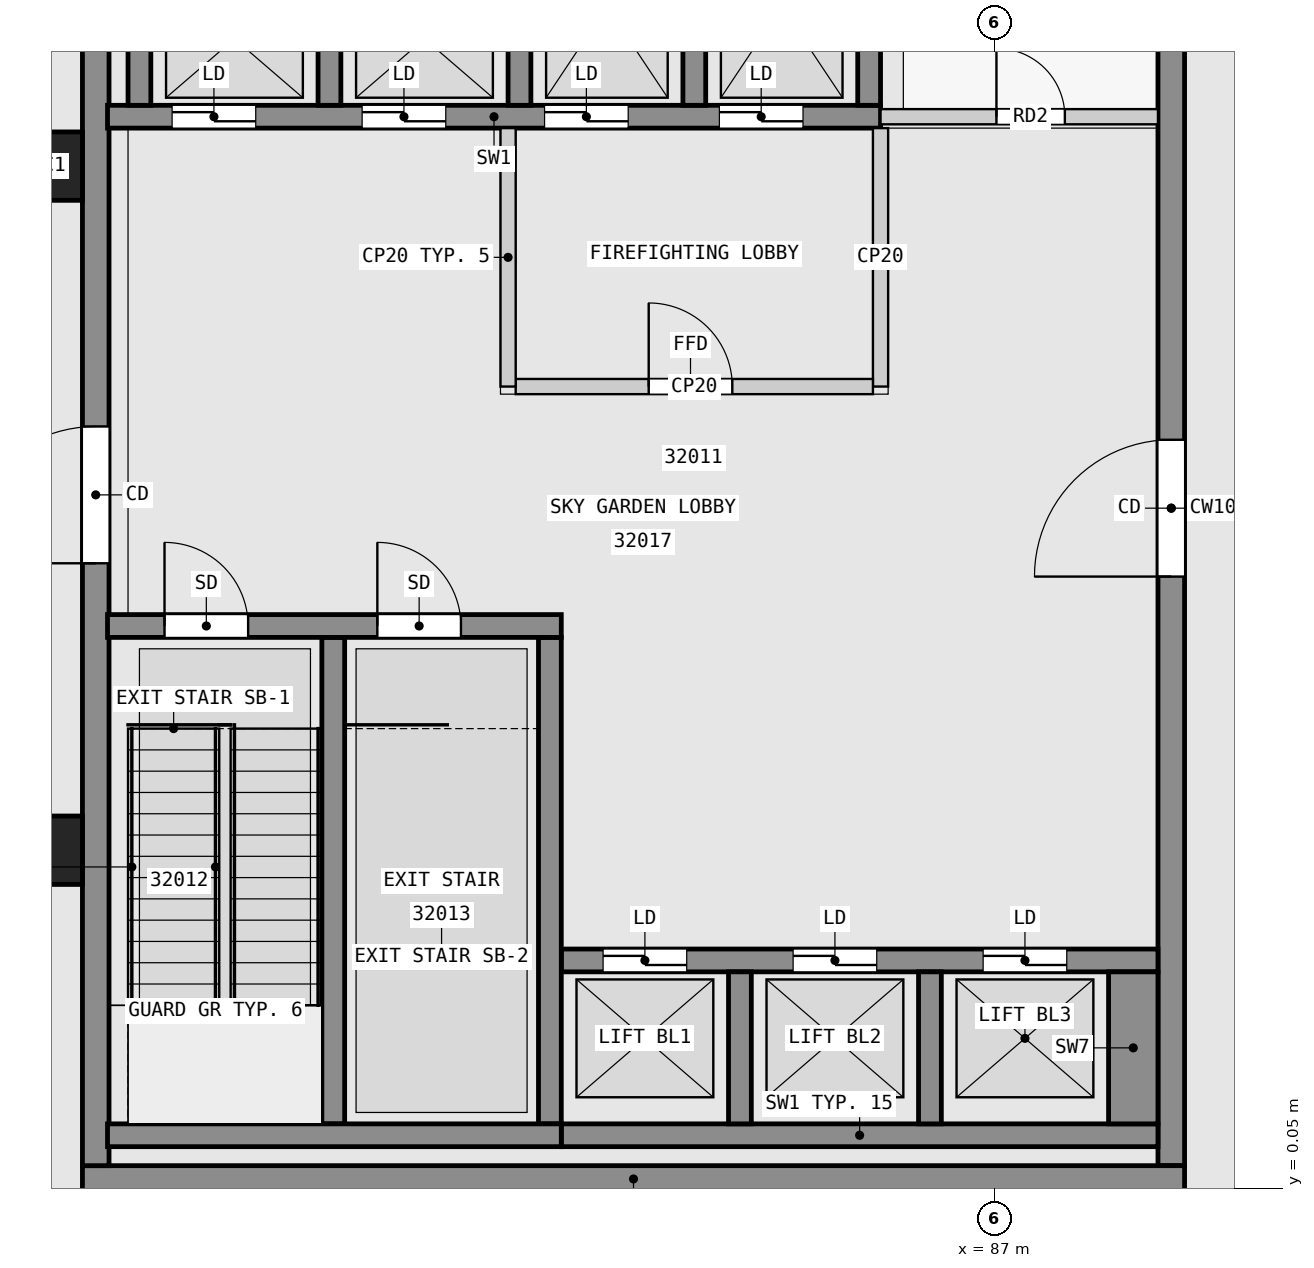
"""IFC4 building model, lengths in metres.
Left out: names, types, materials, properties, quantities, classifications, styles, units other than length and angle.
Written with IfcOpenShell. Run it as: python <this file> out.ifc"""

import sys

from ifc_helpers import new_model, si_unit, direction, frame, frame_2d, origin, origin_2d, place, context, subcontext, project, spatial, rectangle, extrude, element, fill, save


model = new_model("IFC4")
c1 = context("Model", 3, precision=1e-05, world=origin(), true_north=direction((0.0, 1.0)))
c2 = subcontext(c1, "Body", "Model", "MODEL_VIEW")
j1 = project(units=[si_unit("LENGTHUNIT", "METRE"), si_unit("PLANEANGLEUNIT", "RADIAN")], contexts=[c1])
p1 = place(None, origin())
s1 = spatial("IfcSite", under=j1, at=p1, CompositionType="ELEMENT")
p2 = place(p1, origin())
s2 = spatial("IfcBuilding", under=s1, at=p2, CompositionType="ELEMENT")
p3 = place(p2, frame((0.0, 0.0, 123.8)))
s3 = spatial("IfcBuildingStorey", under=s2, at=p3, CompositionType="ELEMENT", Elevation=123.8)
for number, where, z_axis, x_axis in (
    (1, (74.55, 13.5, 0.0), (0.0, 0.0, 1.0), (1.0, 0.0, 0.0)),
    (2, (74.55, 4.5, 0.0), (0.0, 0.0, 1.0), (1.0, 0.0, 0.0)),
):
    element("IfcColumn", number, at=place(p3, frame(where, z_axis=z_axis, x_axis=x_axis)), inside=s3, PredefinedType="COLUMN", context=c2, shape_type="SweptSolid", body=[
        extrude(rectangle(XDim=0.9, YDim=0.9, at=origin_2d()), origin(), (0.0, 0.0, 1.0), 4.8),
    ])
p4 = place(p3, frame((75.0, 0.175, 0.0), z_axis=(0.0, 0.0, 1.0), x_axis=(1.0, 0.0, 0.0)))
e3 = element("IfcWall", 3, at=p4, inside=s3, PredefinedType="SHEAR", context=c2, shape_type="SweptSolid", body=[
    extrude(rectangle(XDim=14.5, YDim=0.35, at=frame_2d((7.25, 0.0))), origin(), (0.0, 0.0, 1.0), 4.5),
])
p5 = place(p3, frame((75.175, 0.35, 0.0), z_axis=(0.0, 0.0, 1.0), x_axis=(0.0, 1.0, 0.0)))
e4 = element("IfcWall", 4, at=p5, inside=s3, PredefinedType="SHEAR", context=c2, shape_type="SweptSolid", body=[
    extrude(rectangle(XDim=17.3, YDim=0.35, at=frame_2d((8.65, 0.0))), origin(), (0.0, 0.0, 1.0), 4.5),
])
p6 = place(p5, frame((7.925, 0.0, 0.0)))
e5 = element("IfcOpeningElement", 5, at=p6, cuts=e4, PredefinedType="OPENING", context=c2, shape_type="SweptSolid", body=[
    extrude(rectangle(XDim=1.8, YDim=2.1, at=frame_2d((0.9, 1.05))), frame((0.0, 0.185, 0.0), z_axis=(0.0, -1.0, 0.0), x_axis=(1.0, 0.0, 0.0)), (0.0, 0.0, 1.0), 0.37),
])
p7 = place(p3, frame((89.325, 0.35, 0.0), z_axis=(0.0, 0.0, 1.0), x_axis=(0.0, 1.0, 0.0)))
e6 = element("IfcWall", 6, at=p7, inside=s3, PredefinedType="SHEAR", context=c2, shape_type="SweptSolid", body=[
    extrude(rectangle(XDim=17.3, YDim=0.35, at=frame_2d((8.65, 0.0))), origin(), (0.0, 0.0, 1.0), 4.5),
])
p8 = place(p7, frame((7.75, 0.0, 0.0)))
e7 = element("IfcOpeningElement", 7, at=p8, cuts=e6, PredefinedType="OPENING", context=c2, shape_type="SweptSolid", body=[
    extrude(rectangle(XDim=1.8, YDim=2.1, at=frame_2d((0.9, 1.05))), frame((0.0, 0.185, 0.0), z_axis=(0.0, -1.0, 0.0), x_axis=(1.0, 0.0, 0.0)), (0.0, 0.0, 1.0), 0.37),
])
p9 = place(p7, frame((16.2, 0.0, 0.0)))
e8 = element("IfcOpeningElement", 8, at=p9, cuts=e6, PredefinedType="OPENING", context=c2, shape_type="SweptSolid", body=[
    extrude(rectangle(XDim=0.9, YDim=2.1, at=frame_2d((0.45, 1.05))), frame((0.0, 0.185, 0.0), z_axis=(0.0, -1.0, 0.0), x_axis=(1.0, 0.0, 0.0)), (0.0, 0.0, 1.0), 0.37),
])
p10 = place(p3, frame((75.33, 0.75, 0.0), z_axis=(0.0, 0.0, 1.0), x_axis=(1.0, 0.0, 0.0)))
e9 = element("IfcWall", 9, at=p10, inside=s3, PredefinedType="SHEAR", context=c2, shape_type="SweptSolid", body=[
    extrude(rectangle(XDim=5.97, YDim=0.3, at=frame_2d((2.985, 0.0))), origin(), (0.0, 0.0, 1.0), 4.5),
])
p11 = place(p3, frame((75.33, 7.45, 0.0), z_axis=(0.0, 0.0, 1.0), x_axis=(1.0, 0.0, 0.0)))
e10 = element("IfcWall", 10, at=p11, inside=s3, PredefinedType="SHEAR", context=c2, shape_type="SweptSolid", body=[
    extrude(rectangle(XDim=5.97, YDim=0.3, at=frame_2d((2.985, 0.0))), origin(), (0.0, 0.0, 1.0), 4.5),
])
p12 = place(p11, frame((0.75, 0.0, 0.0)))
e11 = element("IfcOpeningElement", 11, at=p12, cuts=e10, PredefinedType="OPENING", context=c2, shape_type="SweptSolid", body=[
    extrude(rectangle(XDim=1.1, YDim=2.1, at=frame_2d((0.55, 1.05))), frame((0.0, 0.16, 0.0), z_axis=(0.0, -1.0, 0.0), x_axis=(1.0, 0.0, 0.0)), (0.0, 0.0, 1.0), 0.32),
])
p13 = place(p11, frame((3.55, 0.0, 0.0)))
e12 = element("IfcOpeningElement", 12, at=p13, cuts=e10, PredefinedType="OPENING", context=c2, shape_type="SweptSolid", body=[
    extrude(rectangle(XDim=1.1, YDim=2.1, at=frame_2d((0.55, 1.05))), frame((0.0, 0.16, 0.0), z_axis=(0.0, -1.0, 0.0), x_axis=(1.0, 0.0, 0.0)), (0.0, 0.0, 1.0), 0.32),
])
for number, where, z_axis, x_axis in (
    (13, (78.3, 0.9, 0.0), (0.0, 0.0, 1.0), (0.0, 1.0, 0.0)),
    (14, (81.15, 0.9, 0.0), (0.0, 0.0, 1.0), (0.0, 1.0, 0.0)),
):
    element("IfcWall", number, at=place(p3, frame(where, z_axis=z_axis, x_axis=x_axis)), inside=s3, PredefinedType="SHEAR", context=c2, shape_type="SweptSolid", body=[
        extrude(rectangle(XDim=6.4, YDim=0.3, at=frame_2d((3.2, 0.0))), origin(), (0.0, 0.0, 1.0), 4.5),
    ])
p14 = place(p3, frame((81.3, 0.75, 0.0), z_axis=(0.0, 0.0, 1.0), x_axis=(1.0, 0.0, 0.0)))
e15 = element("IfcWall", 15, at=p14, inside=s3, PredefinedType="SHEAR", context=c2, shape_type="SweptSolid", body=[
    extrude(rectangle(XDim=7.85, YDim=0.3, at=frame_2d((3.925, 0.0))), origin(), (0.0, 0.0, 1.0), 4.5),
])
for number, where, z_axis, x_axis in (
    (16, (83.65, 0.9, 0.0), (0.0, 0.0, 1.0), (0.0, 1.0, 0.0)),
    (17, (86.15, 0.9, 0.0), (0.0, 0.0, 1.0), (0.0, 1.0, 0.0)),
):
    element("IfcWall", number, at=place(p3, frame(where, z_axis=z_axis, x_axis=x_axis)), inside=s3, PredefinedType="SHEAR", context=c2, shape_type="SweptSolid", body=[
        extrude(rectangle(XDim=2.0, YDim=0.3, at=frame_2d((1.0, 0.0))), origin(), (0.0, 0.0, 1.0), 4.5),
    ])
p15 = place(p3, frame((88.825, 0.9, 0.0), z_axis=(0.0, 0.0, 1.0), x_axis=(0.0, 1.0, 0.0)))
e18 = element("IfcWall", 18, at=p15, inside=s3, PredefinedType="SHEAR", context=c2, shape_type="SweptSolid", body=[
    extrude(rectangle(XDim=2.0, YDim=0.65, at=frame_2d((1.0, 0.0))), origin(), (0.0, 0.0, 1.0), 4.5),
])
p16 = place(p3, frame((81.3, 3.05, 0.0), z_axis=(0.0, 0.0, 1.0), x_axis=(1.0, 0.0, 0.0)))
e19 = element("IfcWall", 19, at=p16, inside=s3, PredefinedType="SHEAR", context=c2, shape_type="SweptSolid", body=[
    extrude(rectangle(XDim=7.85, YDim=0.3, at=frame_2d((3.925, 0.0))), origin(), (0.0, 0.0, 1.0), 4.5),
])
p17 = place(p16, frame((0.55, 0.0, 0.0)))
e20 = element("IfcOpeningElement", 20, at=p17, cuts=e19, PredefinedType="OPENING", context=c2, shape_type="SweptSolid", body=[
    extrude(rectangle(XDim=1.1, YDim=2.1, at=frame_2d((0.55, 1.05))), frame((0.0, 0.16, 0.0), z_axis=(0.0, -1.0, 0.0), x_axis=(1.0, 0.0, 0.0)), (0.0, 0.0, 1.0), 0.32),
])
p18 = place(p16, frame((3.05, 0.0, 0.0)))
e21 = element("IfcOpeningElement", 21, at=p18, cuts=e19, PredefinedType="OPENING", context=c2, shape_type="SweptSolid", body=[
    extrude(rectangle(XDim=1.1, YDim=2.1, at=frame_2d((0.55, 1.05))), frame((0.0, 0.16, 0.0), z_axis=(0.0, -1.0, 0.0), x_axis=(1.0, 0.0, 0.0)), (0.0, 0.0, 1.0), 0.32),
])
p19 = place(p16, frame((5.55, 0.0, 0.0)))
e22 = element("IfcOpeningElement", 22, at=p19, cuts=e19, PredefinedType="OPENING", context=c2, shape_type="SweptSolid", body=[
    extrude(rectangle(XDim=1.1, YDim=2.1, at=frame_2d((0.55, 1.05))), frame((0.0, 0.16, 0.0), z_axis=(0.0, -1.0, 0.0), x_axis=(1.0, 0.0, 0.0)), (0.0, 0.0, 1.0), 0.32),
])
p20 = place(p3, frame((75.33, 14.15, 0.0), z_axis=(0.0, 0.0, 1.0), x_axis=(1.0, 0.0, 0.0)))
e23 = element("IfcWall", 23, at=p20, inside=s3, PredefinedType="SHEAR", context=c2, shape_type="SweptSolid", body=[
    extrude(rectangle(XDim=10.17, YDim=0.3, at=frame_2d((5.085, 0.0))), origin(), (0.0, 0.0, 1.0), 4.5),
])
p21 = place(p20, frame((0.85, 0.0, 0.0)))
e24 = element("IfcOpeningElement", 24, at=p21, cuts=e23, PredefinedType="OPENING", context=c2, shape_type="SweptSolid", body=[
    extrude(rectangle(XDim=1.1, YDim=2.1, at=frame_2d((0.55, 1.05))), frame((0.0, 0.16, 0.0), z_axis=(0.0, -1.0, 0.0), x_axis=(1.0, 0.0, 0.0)), (0.0, 0.0, 1.0), 0.32),
])
p22 = place(p20, frame((3.35, 0.0, 0.0)))
e25 = element("IfcOpeningElement", 25, at=p22, cuts=e23, PredefinedType="OPENING", context=c2, shape_type="SweptSolid", body=[
    extrude(rectangle(XDim=1.1, YDim=2.1, at=frame_2d((0.55, 1.05))), frame((0.0, 0.16, 0.0), z_axis=(0.0, -1.0, 0.0), x_axis=(1.0, 0.0, 0.0)), (0.0, 0.0, 1.0), 0.32),
])
p23 = place(p20, frame((5.75, 0.0, 0.0)))
e26 = element("IfcOpeningElement", 26, at=p23, cuts=e23, PredefinedType="OPENING", context=c2, shape_type="SweptSolid", body=[
    extrude(rectangle(XDim=1.1, YDim=2.1, at=frame_2d((0.55, 1.05))), frame((0.0, 0.16, 0.0), z_axis=(0.0, -1.0, 0.0), x_axis=(1.0, 0.0, 0.0)), (0.0, 0.0, 1.0), 0.32),
])
p24 = place(p20, frame((8.05, 0.0, 0.0)))
e27 = element("IfcOpeningElement", 27, at=p24, cuts=e23, PredefinedType="OPENING", context=c2, shape_type="SweptSolid", body=[
    extrude(rectangle(XDim=1.1, YDim=2.1, at=frame_2d((0.55, 1.05))), frame((0.0, 0.16, 0.0), z_axis=(0.0, -1.0, 0.0), x_axis=(1.0, 0.0, 0.0)), (0.0, 0.0, 1.0), 0.32),
])
for number, where, z_axis, x_axis in (
    (28, (75.75, 14.3, 0.0), (0.0, 0.0, 1.0), (0.0, 1.0, 0.0)),
    (29, (78.25, 14.3, 0.0), (0.0, 0.0, 1.0), (0.0, 1.0, 0.0)),
    (30, (80.75, 14.3, 0.0), (0.0, 0.0, 1.0), (0.0, 1.0, 0.0)),
    (31, (83.05, 14.3, 0.0), (0.0, 0.0, 1.0), (0.0, 1.0, 0.0)),
    (32, (85.35, 14.3, 0.0), (0.0, 0.0, 1.0), (0.0, 1.0, 0.0)),
):
    element("IfcWall", number, at=place(p3, frame(where, z_axis=z_axis, x_axis=x_axis)), inside=s3, PredefinedType="SHEAR", context=c2, shape_type="SweptSolid", body=[
        extrude(rectangle(XDim=2.8, YDim=0.3, at=frame_2d((1.4, 0.0))), origin(), (0.0, 0.0, 1.0), 4.5),
    ])
p25 = place(p3, frame((80.6, 10.6, 0.0), z_axis=(0.0, 0.0, 1.0), x_axis=(0.0, 1.0, 0.0)))
e33 = element("IfcWall", 33, at=p25, inside=s3, PredefinedType="PARTITIONING", context=c2, shape_type="SweptSolid", body=[
    extrude(rectangle(XDim=3.4, YDim=0.2, at=frame_2d((1.7, 0.0))), origin(), (0.0, 0.0, 1.0), 4.5),
])
p26 = place(p3, frame((80.7, 10.6, 0.0), z_axis=(0.0, 0.0, 1.0), x_axis=(1.0, 0.0, 0.0)))
e34 = element("IfcWall", 34, at=p26, inside=s3, PredefinedType="PARTITIONING", context=c2, shape_type="SweptSolid", body=[
    extrude(rectangle(XDim=4.7, YDim=0.2, at=frame_2d((2.35, 0.0))), origin(), (0.0, 0.0, 1.0), 4.5),
])
p27 = place(p26, frame((1.75, 0.0, 0.0)))
e35 = element("IfcOpeningElement", 35, at=p27, cuts=e34, PredefinedType="OPENING", context=c2, shape_type="SweptSolid", body=[
    extrude(rectangle(XDim=1.1, YDim=2.1, at=frame_2d((0.55, 1.05))), frame((0.0, 0.11, 0.0), z_axis=(0.0, -1.0, 0.0), x_axis=(1.0, 0.0, 0.0)), (0.0, 0.0, 1.0), 0.22),
])
p28 = place(p3, frame((85.5, 10.6, 0.0), z_axis=(0.0, 0.0, 1.0), x_axis=(0.0, 1.0, 0.0)))
e36 = element("IfcWall", 36, at=p28, inside=s3, PredefinedType="PARTITIONING", context=c2, shape_type="SweptSolid", body=[
    extrude(rectangle(XDim=3.4, YDim=0.2, at=frame_2d((1.7, 0.0))), origin(), (0.0, 0.0, 1.0), 4.5),
])
p29 = place(p3, frame((85.5, 14.15, 0.0), z_axis=(0.0, 0.0, 1.0), x_axis=(1.0, 0.0, 0.0)))
e37 = element("IfcWall", 37, at=p29, inside=s3, PredefinedType="PARTITIONING", context=c2, shape_type="SweptSolid", body=[
    extrude(rectangle(XDim=3.65, YDim=0.2, at=frame_2d((1.825, 0.0))), origin(), (0.0, 0.0, 1.0), 4.5),
])
p30 = place(p29, frame((1.525, 0.0, 0.0)))
e38 = element("IfcOpeningElement", 38, at=p30, cuts=e37, PredefinedType="OPENING", context=c2, shape_type="SweptSolid", body=[
    extrude(rectangle(XDim=0.9, YDim=2.1, at=frame_2d((0.45, 1.05))), frame((0.0, 0.11, 0.0), z_axis=(0.0, -1.0, 0.0), x_axis=(1.0, 0.0, 0.0)), (0.0, 0.0, 1.0), 0.22),
])
p31 = place(p27, origin())
e39 = element("IfcDoor", 39, at=p31, inside=s3, OperationType="SINGLE_SWING_LEFT", PredefinedType="DOOR", context=c2, shape_type="SweptSolid", body=[
    extrude(rectangle(XDim=1.1, YDim=2.1, at=frame_2d((0.55, 1.05))), frame((0.0, 0.025, 0.0), z_axis=(0.0, -1.0, 0.0), x_axis=(1.0, 0.0, 0.0)), (0.0, 0.0, 1.0), 0.05),
])
fill(e35, e39)
p32 = place(p17, origin())
e40 = element("IfcDoor", 40, at=p32, inside=s3, OperationType="DOUBLE_DOOR_SLIDING", PredefinedType="DOOR", context=c2, shape_type="SweptSolid", body=[
    extrude(rectangle(XDim=1.1, YDim=2.1, at=frame_2d((0.55, 1.05))), frame((0.0, 0.025, 0.0), z_axis=(0.0, -1.0, 0.0), x_axis=(1.0, 0.0, 0.0)), (0.0, 0.0, 1.0), 0.05),
])
fill(e20, e40)
p33 = place(p18, origin())
e41 = element("IfcDoor", 41, at=p33, inside=s3, OperationType="DOUBLE_DOOR_SLIDING", PredefinedType="DOOR", context=c2, shape_type="SweptSolid", body=[
    extrude(rectangle(XDim=1.1, YDim=2.1, at=frame_2d((0.55, 1.05))), frame((0.0, 0.025, 0.0), z_axis=(0.0, -1.0, 0.0), x_axis=(1.0, 0.0, 0.0)), (0.0, 0.0, 1.0), 0.05),
])
fill(e21, e41)
p34 = place(p19, origin())
e42 = element("IfcDoor", 42, at=p34, inside=s3, OperationType="DOUBLE_DOOR_SLIDING", PredefinedType="DOOR", context=c2, shape_type="SweptSolid", body=[
    extrude(rectangle(XDim=1.1, YDim=2.1, at=frame_2d((0.55, 1.05))), frame((0.0, 0.025, 0.0), z_axis=(0.0, -1.0, 0.0), x_axis=(1.0, 0.0, 0.0)), (0.0, 0.0, 1.0), 0.05),
])
fill(e22, e42)
p35 = place(p21, origin())
e43 = element("IfcDoor", 43, at=p35, inside=s3, OperationType="DOUBLE_DOOR_SLIDING", PredefinedType="DOOR", context=c2, shape_type="SweptSolid", body=[
    extrude(rectangle(XDim=1.1, YDim=2.1, at=frame_2d((0.55, 1.05))), frame((0.0, 0.025, 0.0), z_axis=(0.0, -1.0, 0.0), x_axis=(1.0, 0.0, 0.0)), (0.0, 0.0, 1.0), 0.05),
])
fill(e24, e43)
p36 = place(p22, origin())
e44 = element("IfcDoor", 44, at=p36, inside=s3, OperationType="DOUBLE_DOOR_SLIDING", PredefinedType="DOOR", context=c2, shape_type="SweptSolid", body=[
    extrude(rectangle(XDim=1.1, YDim=2.1, at=frame_2d((0.55, 1.05))), frame((0.0, 0.025, 0.0), z_axis=(0.0, -1.0, 0.0), x_axis=(1.0, 0.0, 0.0)), (0.0, 0.0, 1.0), 0.05),
])
fill(e25, e44)
p37 = place(p23, origin())
e45 = element("IfcDoor", 45, at=p37, inside=s3, OperationType="DOUBLE_DOOR_SLIDING", PredefinedType="DOOR", context=c2, shape_type="SweptSolid", body=[
    extrude(rectangle(XDim=1.1, YDim=2.1, at=frame_2d((0.55, 1.05))), frame((0.0, 0.025, 0.0), z_axis=(0.0, -1.0, 0.0), x_axis=(1.0, 0.0, 0.0)), (0.0, 0.0, 1.0), 0.05),
])
fill(e26, e45)
p38 = place(p24, origin())
e46 = element("IfcDoor", 46, at=p38, inside=s3, OperationType="DOUBLE_DOOR_SLIDING", PredefinedType="DOOR", context=c2, shape_type="SweptSolid", body=[
    extrude(rectangle(XDim=1.1, YDim=2.1, at=frame_2d((0.55, 1.05))), frame((0.0, 0.025, 0.0), z_axis=(0.0, -1.0, 0.0), x_axis=(1.0, 0.0, 0.0)), (0.0, 0.0, 1.0), 0.05),
])
fill(e27, e46)
p39 = place(p12, origin())
e47 = element("IfcDoor", 47, at=p39, inside=s3, OperationType="SINGLE_SWING_RIGHT", PredefinedType="DOOR", context=c2, shape_type="SweptSolid", body=[
    extrude(rectangle(XDim=1.1, YDim=2.1, at=frame_2d((0.55, 1.05))), frame((0.0, 0.025, 0.0), z_axis=(0.0, -1.0, 0.0), x_axis=(1.0, 0.0, 0.0)), (0.0, 0.0, 1.0), 0.05),
])
fill(e11, e47)
p40 = place(p13, origin())
e48 = element("IfcDoor", 48, at=p40, inside=s3, OperationType="SINGLE_SWING_LEFT", PredefinedType="DOOR", context=c2, shape_type="SweptSolid", body=[
    extrude(rectangle(XDim=1.1, YDim=2.1, at=frame_2d((0.55, 1.05))), frame((0.0, 0.025, 0.0), z_axis=(0.0, -1.0, 0.0), x_axis=(1.0, 0.0, 0.0)), (0.0, 0.0, 1.0), 0.05),
])
fill(e12, e48)
p41 = place(p6, origin())
e49 = element("IfcDoor", 49, at=p41, inside=s3, OperationType="DOUBLE_DOOR_SINGLE_SWING", PredefinedType="DOOR", context=c2, shape_type="SweptSolid", body=[
    extrude(rectangle(XDim=1.8, YDim=2.1, at=frame_2d((0.9, 1.05))), frame((0.0, 0.025, 0.0), z_axis=(0.0, -1.0, 0.0), x_axis=(1.0, 0.0, 0.0)), (0.0, 0.0, 1.0), 0.05),
])
fill(e5, e49)
p42 = place(p8, origin())
e50 = element("IfcDoor", 50, at=p42, inside=s3, OperationType="DOUBLE_DOOR_SINGLE_SWING", PredefinedType="DOOR", context=c2, shape_type="SweptSolid", body=[
    extrude(rectangle(XDim=1.8, YDim=2.1, at=frame_2d((0.9, 1.05))), frame((0.0, 0.025, 0.0), z_axis=(0.0, -1.0, 0.0), x_axis=(1.0, 0.0, 0.0)), (0.0, 0.0, 1.0), 0.05),
])
fill(e7, e50)
p43 = place(p30, origin())
e51 = element("IfcDoor", 51, at=p43, inside=s3, OperationType="SINGLE_SWING_LEFT", PredefinedType="DOOR", context=c2, shape_type="SweptSolid", body=[
    extrude(rectangle(XDim=0.9, YDim=2.1, at=frame_2d((0.45, 1.05))), frame((0.0, 0.025, 0.0), z_axis=(0.0, -1.0, 0.0), x_axis=(1.0, 0.0, 0.0)), (0.0, 0.0, 1.0), 0.05),
])
fill(e38, e51)
save(model, sys.argv[1])
